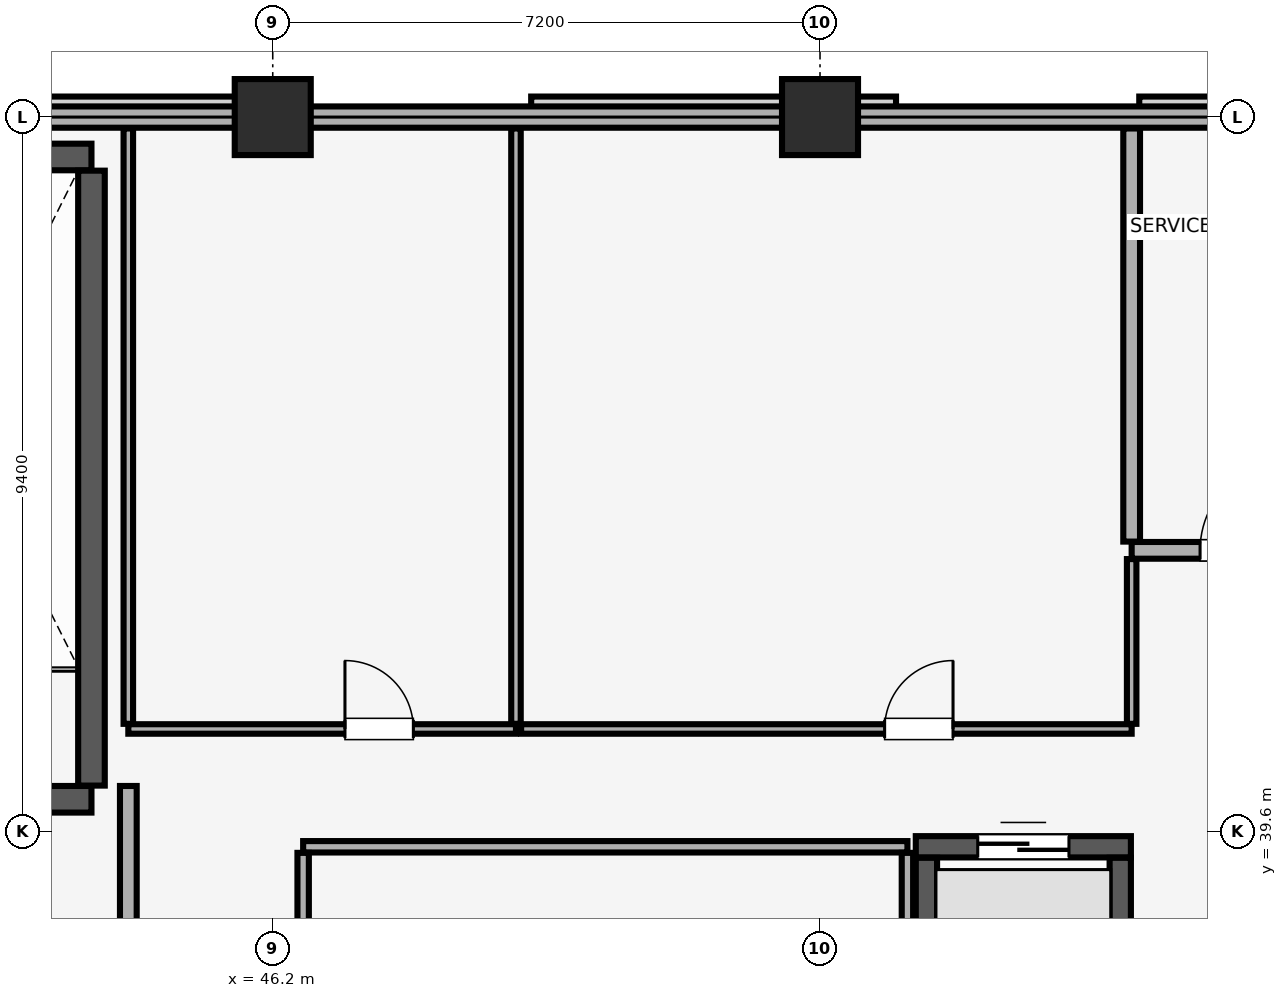
"""IFC4 building model, lengths in metres.
Left out: names, types, materials, properties, quantities, classifications, styles, units other than length and angle.
Written with IfcOpenShell. Run it as: python <this file> out.ifc"""

import sys

from ifc_helpers import new_model, si_unit, direction, frame, frame_2d, origin, origin_2d, place, context, subcontext, project, spatial, rectangle, extrude, element, fill, save


model = new_model("IFC4")
c1 = context("Model", 3, precision=1e-05, world=origin(), true_north=direction((0.0, 1.0)))
c2 = subcontext(c1, "Body", "Model", "MODEL_VIEW")
j1 = project(units=[si_unit("LENGTHUNIT", "METRE"), si_unit("PLANEANGLEUNIT", "RADIAN")], contexts=[c1])
p1 = place(None, origin())
s1 = spatial("IfcSite", under=j1, at=p1, CompositionType="ELEMENT")
p2 = place(p1, origin())
s2 = spatial("IfcBuilding", under=s1, at=p2, CompositionType="ELEMENT")
p3 = place(p2, frame((0.0, 0.0, 310.7)))
s3 = spatial("IfcBuildingStorey", under=s2, at=p3, CompositionType="ELEMENT", Elevation=310.7)
for number, where, z_axis, x_axis in (
    (1, (46.2, 49.0, 0.0), (0.0, 0.0, 1.0), (1.0, 0.0, 0.0)),
    (2, (53.4, 49.0, 0.0), (0.0, 0.0, 1.0), (1.0, 0.0, 0.0)),
):
    element("IfcColumn", number, at=place(p3, frame(where, z_axis=z_axis, x_axis=x_axis)), inside=s3, PredefinedType="COLUMN", context=c2, shape_type="SweptSolid", body=[
        extrude(rectangle(XDim=1.0, YDim=1.0, at=origin_2d()), origin(), (0.0, 0.0, 1.0), 7.5),
    ])
p4 = place(p3, frame((67.0, 49.0, 0.0), z_axis=(0.0, 0.0, 1.0), x_axis=(-1.0, 0.0, 0.0)))
e3 = element("IfcWall", 3, at=p4, inside=s3, PredefinedType="SOLIDWALL", context=c2, shape_type="SweptSolid", body=[
    extrude(rectangle(XDim=50.0, YDim=0.28, at=frame_2d((25.0, 0.0))), origin(), (0.0, 0.0, 1.0), 7.0),
])
p5 = place(p3, frame((40.185, 40.025, 0.0), z_axis=(0.0, 0.0, 1.0), x_axis=(1.0, 0.0, 0.0)))
e4 = element("IfcWall", 4, at=p5, inside=s3, PredefinedType="SHEAR", context=c2, shape_type="SweptSolid", body=[
    extrude(rectangle(XDim=3.63, YDim=0.35, at=frame_2d((1.815, 0.0))), origin(), (0.0, 0.0, 1.0), 7.5),
])
p6 = place(p5, frame((1.24, 0.0, 0.0)))
e5 = element("IfcOpeningElement", 5, at=p6, cuts=e4, PredefinedType="OPENING", context=c2, shape_type="SweptSolid", body=[
    extrude(rectangle(XDim=1.15, YDim=2.15, at=frame_2d((0.575, 1.075))), frame((0.0, 0.185, 0.0), z_axis=(0.0, -1.0, 0.0), x_axis=(1.0, 0.0, 0.0)), (0.0, 0.0, 1.0), 0.37),
])
p7 = place(p3, frame((40.185, 48.475, 0.0), z_axis=(0.0, 0.0, 1.0), x_axis=(1.0, 0.0, 0.0)))
e6 = element("IfcWall", 6, at=p7, inside=s3, PredefinedType="SHEAR", context=c2, shape_type="SweptSolid", body=[
    extrude(rectangle(XDim=3.63, YDim=0.35, at=frame_2d((1.815, 0.0))), origin(), (0.0, 0.0, 1.0), 7.5),
])
p8 = place(p3, frame((43.815, 40.205, 0.0), z_axis=(0.0, 0.0, 1.0), x_axis=(0.0, 1.0, 0.0)))
e7 = element("IfcWall", 7, at=p8, inside=s3, PredefinedType="SHEAR", context=c2, shape_type="SweptSolid", body=[
    extrude(rectangle(XDim=8.09, YDim=0.35, at=frame_2d((4.045, 0.0))), origin(), (0.0, 0.0, 1.0), 7.5),
])
p9 = place(p3, frame((54.66, 39.4, 0.0), z_axis=(0.0, 0.0, 1.0), x_axis=(1.0, 0.0, 0.0)))
e8 = element("IfcWall", 8, at=p9, inside=s3, PredefinedType="SHEAR", context=c2, shape_type="SweptSolid", body=[
    extrude(rectangle(XDim=2.83, YDim=0.28, at=frame_2d((1.415, 0.0))), origin(), (0.0, 0.0, 1.0), 7.5),
])
p10 = place(p9, frame((0.815, 0.0, 0.0)))
e9 = element("IfcOpeningElement", 9, at=p10, cuts=e8, PredefinedType="OPENING", context=c2, shape_type="SweptSolid", body=[
    extrude(rectangle(XDim=1.2, YDim=2.25, at=frame_2d((0.6, 1.125))), frame((0.0, 0.15, 0.0), z_axis=(0.0, -1.0, 0.0), x_axis=(1.0, 0.0, 0.0)), (0.0, 0.0, 1.0), 0.3),
])
for number, where, z_axis, x_axis in (
    (10, (54.8, 37.145, 0.0), (0.0, 0.0, 1.0), (0.0, 1.0, 0.0)),
    (11, (57.35, 37.145, 0.0), (0.0, 0.0, 1.0), (0.0, 1.0, 0.0)),
):
    element("IfcWall", number, at=place(p3, frame(where, z_axis=z_axis, x_axis=x_axis)), inside=s3, PredefinedType="SHEAR", context=c2, shape_type="SweptSolid", body=[
        extrude(rectangle(XDim=2.11, YDim=0.28, at=frame_2d((1.055, 0.0))), origin(), (0.0, 0.0, 1.0), 7.5),
    ])
p11 = place(p3, frame((44.3, 34.415, 0.0), z_axis=(0.0, 0.0, 1.0), x_axis=(0.0, 1.0, 0.0)))
e12 = element("IfcWall", 12, at=p11, inside=s3, PredefinedType="PARTITIONING", context=c2, shape_type="SweptSolid", body=[
    extrude(rectangle(XDim=5.785, YDim=0.22, at=frame_2d((2.893, 0.0))), origin(), (0.0, 0.0, 1.0), 7.5),
])
p12 = place(p3, frame((57.5, 43.3, 0.0), z_axis=(0.0, 0.0, 1.0), x_axis=(1.0, 0.0, 0.0)))
e13 = element("IfcWall", 13, at=p12, inside=s3, PredefinedType="PARTITIONING", context=c2, shape_type="SweptSolid", body=[
    extrude(rectangle(XDim=3.04, YDim=0.22, at=frame_2d((1.52, 0.0))), origin(), (0.0, 0.0, 1.0), 7.5),
])
p13 = place(p12, frame((0.9, 0.0, 0.0)))
e14 = element("IfcOpeningElement", 14, at=p13, cuts=e13, PredefinedType="OPENING", context=c2, shape_type="SweptSolid", body=[
    extrude(rectangle(XDim=1.2, YDim=2.15, at=frame_2d((0.6, 1.075))), frame((0.0, 0.12, 0.0), z_axis=(0.0, -1.0, 0.0), x_axis=(1.0, 0.0, 0.0)), (0.0, 0.0, 1.0), 0.24),
])
p14 = place(p3, frame((57.5, 43.415, 0.0), z_axis=(0.0, 0.0, 1.0), x_axis=(0.0, 1.0, 0.0)))
e15 = element("IfcWall", 15, at=p14, inside=s3, PredefinedType="PARTITIONING", context=c2, shape_type="SweptSolid", body=[
    extrude(rectangle(XDim=5.435, YDim=0.22, at=frame_2d((2.718, 0.0))), origin(), (0.0, 0.0, 1.0), 7.5),
])
p15 = place(p3, frame((46.6, 39.4, 0.0), z_axis=(0.0, 0.0, 1.0), x_axis=(1.0, 0.0, 0.0)))
e16 = element("IfcWall", 16, at=p15, inside=s3, PredefinedType="PARTITIONING", context=c2, shape_type="SweptSolid", body=[
    extrude(rectangle(XDim=7.95, YDim=0.15, at=frame_2d((3.975, 0.0))), origin(), (0.0, 0.0, 1.0), 7.5),
])
for number, where, z_axis, x_axis in (
    (17, (46.6, 34.38, 0.0), (0.0, 0.0, 1.0), (0.0, 1.0, 0.0)),
    (18, (54.55, 34.38, 0.0), (0.0, 0.0, 1.0), (0.0, 1.0, 0.0)),
):
    element("IfcWall", number, at=place(p3, frame(where, z_axis=z_axis, x_axis=x_axis)), inside=s3, PredefinedType="PARTITIONING", context=c2, shape_type="SweptSolid", body=[
        extrude(rectangle(XDim=4.94, YDim=0.15, at=frame_2d((2.47, 0.0))), origin(), (0.0, 0.0, 1.0), 7.5),
    ])
p16 = place(p3, frame((44.3, 40.95, 0.0), z_axis=(0.0, 0.0, 1.0), x_axis=(1.0, 0.0, 0.0)))
e19 = element("IfcWall", 19, at=p16, inside=s3, PredefinedType="PARTITIONING", context=c2, shape_type="SweptSolid", body=[
    extrude(rectangle(XDim=5.1, YDim=0.125, at=frame_2d((2.55, 0.0))), origin(), (0.0, 0.0, 1.0), 7.5),
])
p17 = place(p16, frame((2.85, 0.0, 0.0)))
e20 = element("IfcOpeningElement", 20, at=p17, cuts=e19, PredefinedType="OPENING", context=c2, shape_type="SweptSolid", body=[
    extrude(rectangle(XDim=0.9, YDim=2.1, at=frame_2d((0.45, 1.05))), frame((0.0, 0.073, 0.0), z_axis=(0.0, -1.0, 0.0), x_axis=(1.0, 0.0, 0.0)), (0.0, 0.0, 1.0), 0.145),
])
for number, where, z_axis, x_axis in (
    (21, (44.3, 41.018, 0.0), (0.0, 0.0, 1.0), (0.0, 1.0, 0.0)),
    (22, (49.4, 41.018, 0.0), (0.0, 0.0, 1.0), (0.0, 1.0, 0.0)),
):
    element("IfcWall", number, at=place(p3, frame(where, z_axis=z_axis, x_axis=x_axis)), inside=s3, PredefinedType="PARTITIONING", context=c2, shape_type="SweptSolid", body=[
        extrude(rectangle(XDim=7.833, YDim=0.125, at=frame_2d((3.916, 0.0))), origin(), (0.0, 0.0, 1.0), 7.5),
    ])
p18 = place(p3, frame((49.468, 40.95, 0.0), z_axis=(0.0, 0.0, 1.0), x_axis=(1.0, 0.0, 0.0)))
e23 = element("IfcWall", 23, at=p18, inside=s3, PredefinedType="PARTITIONING", context=c2, shape_type="SweptSolid", body=[
    extrude(rectangle(XDim=8.032, YDim=0.125, at=frame_2d((4.016, 0.0))), origin(), (0.0, 0.0, 1.0), 7.5),
])
p19 = place(p18, frame((4.782, 0.0, 0.0)))
e24 = element("IfcOpeningElement", 24, at=p19, cuts=e23, PredefinedType="OPENING", context=c2, shape_type="SweptSolid", body=[
    extrude(rectangle(XDim=0.9, YDim=2.1, at=frame_2d((0.45, 1.05))), frame((0.0, 0.073, 0.0), z_axis=(0.0, -1.0, 0.0), x_axis=(1.0, 0.0, 0.0)), (0.0, 0.0, 1.0), 0.145),
])
p20 = place(p3, frame((57.5, 41.018, 0.0), z_axis=(0.0, 0.0, 1.0), x_axis=(0.0, 1.0, 0.0)))
e25 = element("IfcWall", 25, at=p20, inside=s3, PredefinedType="PARTITIONING", context=c2, shape_type="SweptSolid", body=[
    extrude(rectangle(XDim=2.167, YDim=0.125, at=frame_2d((1.084, 0.0))), origin(), (0.0, 0.0, 1.0), 7.5),
])
p21 = place(p10, origin())
e26 = element("IfcDoor", 26, at=p21, inside=s3, OperationType="DOUBLE_DOOR_SLIDING", PredefinedType="DOOR", context=c2, shape_type="SweptSolid", body=[
    extrude(rectangle(XDim=1.2, YDim=2.25, at=frame_2d((0.6, 1.125))), frame((0.0, 0.025, 0.0), z_axis=(0.0, -1.0, 0.0), x_axis=(1.0, 0.0, 0.0)), (0.0, 0.0, 1.0), 0.05),
])
fill(e9, e26)
p22 = place(p13, origin())
e27 = element("IfcDoor", 27, at=p22, inside=s3, OperationType="SINGLE_SWING_RIGHT", PredefinedType="DOOR", context=c2, shape_type="SweptSolid", body=[
    extrude(rectangle(XDim=1.2, YDim=2.15, at=frame_2d((0.6, 1.075))), frame((0.0, 0.025, 0.0), z_axis=(0.0, -1.0, 0.0), x_axis=(1.0, 0.0, 0.0)), (0.0, 0.0, 1.0), 0.05),
])
fill(e14, e27)
p23 = place(p17, origin())
e28 = element("IfcDoor", 28, at=p23, inside=s3, OperationType="SINGLE_SWING_LEFT", PredefinedType="DOOR", context=c2, shape_type="SweptSolid", body=[
    extrude(rectangle(XDim=0.9, YDim=2.1, at=frame_2d((0.45, 1.05))), frame((0.0, 0.025, 0.0), z_axis=(0.0, -1.0, 0.0), x_axis=(1.0, 0.0, 0.0)), (0.0, 0.0, 1.0), 0.05),
])
fill(e20, e28)
p24 = place(p19, origin())
e29 = element("IfcDoor", 29, at=p24, inside=s3, OperationType="SINGLE_SWING_RIGHT", PredefinedType="DOOR", context=c2, shape_type="SweptSolid", body=[
    extrude(rectangle(XDim=0.9, YDim=2.1, at=frame_2d((0.45, 1.05))), frame((0.0, 0.025, 0.0), z_axis=(0.0, -1.0, 0.0), x_axis=(1.0, 0.0, 0.0)), (0.0, 0.0, 1.0), 0.05),
])
fill(e24, e29)
save(model, sys.argv[1])
